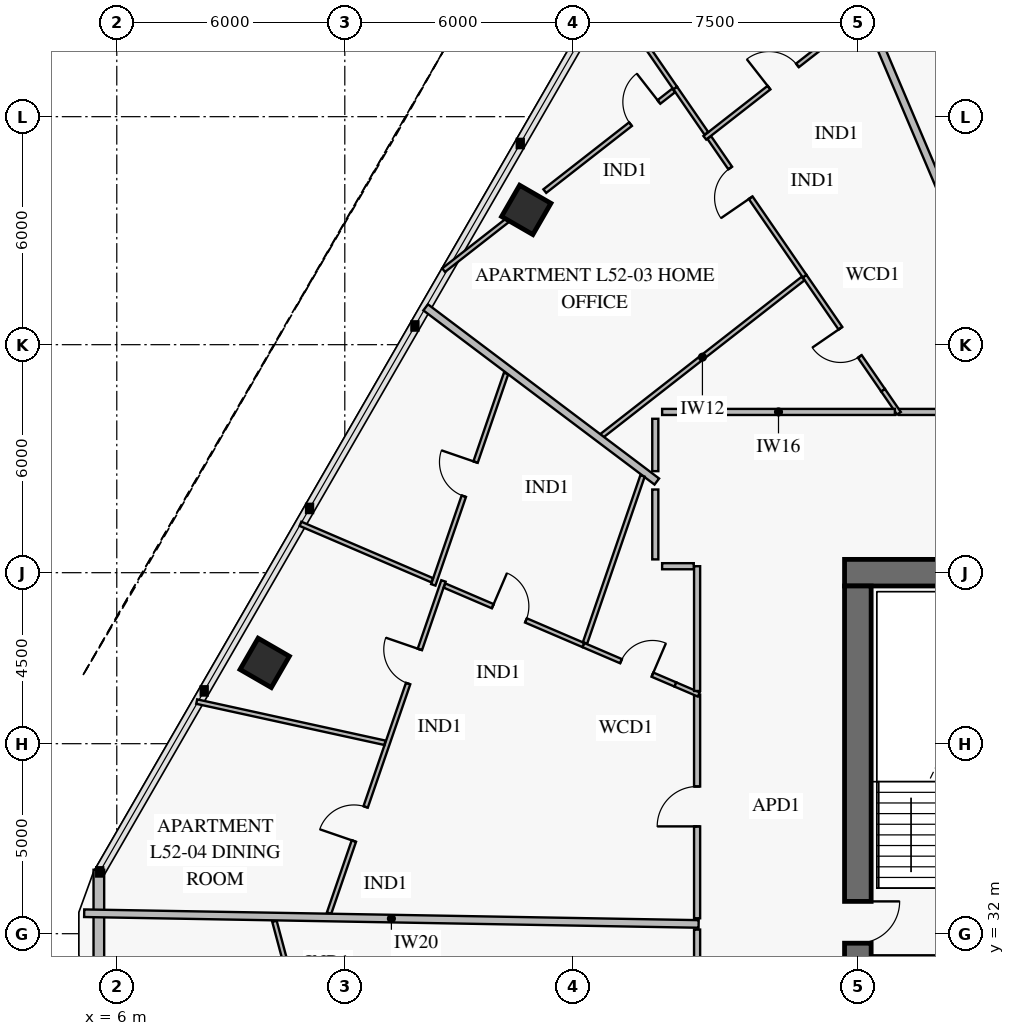
"""IFC4 building model, lengths in metres.
Left out: names, types, materials, properties, quantities, classifications, styles, units other than length and angle.
Written with IfcOpenShell. Run it as: python <this file> out.ifc"""

import sys

from ifc_helpers import new_model, si_unit, direction, frame, frame_2d, origin, origin_2d, place, context, subcontext, project, spatial, rectangle, extrude, element, fill, save


model = new_model("IFC4")
c1 = context("Model", 3, precision=1e-05, world=origin(), true_north=direction((0.0, 1.0)))
c2 = subcontext(c1, "Body", "Model", "MODEL_VIEW")
j1 = project(units=[si_unit("LENGTHUNIT", "METRE"), si_unit("PLANEANGLEUNIT", "RADIAN")], contexts=[c1])
p1 = place(None, origin())
s1 = spatial("IfcSite", under=j1, at=p1, CompositionType="ELEMENT")
p2 = place(p1, origin())
s2 = spatial("IfcBuilding", under=s1, at=p2, CompositionType="ELEMENT")
p3 = place(p2, frame((0.0, 0.0, 207.4)))
s3 = spatial("IfcBuildingStorey", under=s2, at=p3, CompositionType="ELEMENT", Elevation=207.4)
p4 = place(p3, frame((36.75, 41.5, 0.0), z_axis=(0.0, 0.0, 1.0), x_axis=(-1.0, 0.0, 0.0)))
e1 = element("IfcWall", 1, at=p4, inside=s3, PredefinedType="SHEAR", context=c2, shape_type="SweptSolid", body=[
    extrude(rectangle(XDim=11.6, YDim=0.7, at=frame_2d((5.8, 0.0))), origin(), (0.0, 0.0, 1.0), 3.8),
])
p5 = place(p4, frame((4.25, 0.0, 0.0)))
e2 = element("IfcOpeningElement", 2, at=p5, cuts=e1, PredefinedType="OPENING", context=c2, shape_type="SweptSolid", body=[
    extrude(rectangle(XDim=1.1, YDim=2.15, at=frame_2d((0.55, 1.075))), frame((0.0, 0.362, 0.0), z_axis=(0.0, -1.0, 0.0), x_axis=(1.0, 0.0, 0.0)), (0.0, 0.0, 1.0), 0.724),
])
p6 = place(p3, frame((25.5, 22.85, 0.0), z_axis=(0.0, 0.0, 1.0), x_axis=(0.0, 1.0, 0.0)))
e3 = element("IfcWall", 3, at=p6, inside=s3, PredefinedType="SHEAR", context=c2, shape_type="SweptSolid", body=[
    extrude(rectangle(XDim=18.3, YDim=0.7, at=frame_2d((9.15, 0.0))), origin(), (0.0, 0.0, 1.0), 3.8),
])
p7 = place(p6, frame((8.9, 0.0, 0.0)))
e4 = element("IfcOpeningElement", 4, at=p7, cuts=e3, PredefinedType="OPENING", context=c2, shape_type="SweptSolid", body=[
    extrude(rectangle(XDim=1.1, YDim=2.15, at=frame_2d((0.55, 1.075))), frame((0.0, 0.362, 0.0), z_axis=(0.0, -1.0, 0.0), x_axis=(1.0, 0.0, 0.0)), (0.0, 0.0, 1.0), 0.724),
])
for number, where, z_axis, x_axis in (
    (5, (16.774, 51.047, 0.0), (0.0, 0.0, 1.0), (-0.5, -0.866, 0.0)),
    (6, (9.892, 39.126, 0.0), (0.0, 0.0, 1.0), (-0.5, -0.866, 0.0)),
):
    element("IfcColumn", number, at=place(p3, frame(where, z_axis=z_axis, x_axis=x_axis)), inside=s3, PredefinedType="COLUMN", context=c2, shape_type="SweptSolid", body=[
        extrude(rectangle(XDim=0.95, YDim=0.95, at=origin_2d()), origin(), (0.0, 0.0, 1.0), 3.55),
    ])
p8 = place(p3, frame((5.528, 30.317, 0.0), z_axis=(0.0, 0.0, 1.0), x_axis=(0.0, 1.0, 0.0)))
e7 = element("IfcWall", 7, at=p8, inside=s3, PredefinedType="SOLIDWALL", context=c2, shape_type="SweptSolid", body=[
    extrude(rectangle(XDim=3.365, YDim=0.28, at=frame_2d((1.683, 0.0))), origin(), (0.0, 0.0, 1.0), 3.55),
])
p9 = place(p3, frame((25.6, 56.169, 0.0), z_axis=(0.0, 0.0, 1.0), x_axis=(-0.788007411646, -0.615665752816, 0.0)))
e8 = element("IfcWall", 8, at=p9, inside=s3, PredefinedType="PARTITIONING", context=c2, shape_type="SweptSolid", body=[
    extrude(rectangle(XDim=5.237, YDim=0.12, at=frame_2d((2.619, 0.0))), origin(), (0.0, 0.0, 1.0), 2.87),
])
p10 = place(p9, frame((2.144, 0.0, 0.0)))
e9 = element("IfcOpeningElement", 9, at=p10, cuts=e8, PredefinedType="OPENING", context=c2, shape_type="SweptSolid", body=[
    extrude(rectangle(XDim=0.95, YDim=2.1, at=frame_2d((0.475, 1.05))), frame((0.0, 0.072, 0.0), z_axis=(0.0, -1.0, 0.0), x_axis=(1.0, 0.0, 0.0)), (0.0, 0.0, 1.0), 0.144),
])
p11 = place(p3, frame((26.165, 46.3, 0.0), z_axis=(0.0, 0.0, 1.0), x_axis=(-0.566727772042, 0.823905111282, 0.0)))
e10 = element("IfcWall", 10, at=p11, inside=s3, PredefinedType="PARTITIONING", context=c2, shape_type="SweptSolid", body=[
    extrude(rectangle(XDim=3.645, YDim=0.12, at=frame_2d((1.823, 0.0))), origin(), (0.0, 0.0, 1.0), 3.55),
])
p12 = place(p11, frame((1.081, 0.0, 0.0)))
e11 = element("IfcOpeningElement", 11, at=p12, cuts=e10, PredefinedType="OPENING", context=c2, shape_type="SweptSolid", body=[
    extrude(rectangle(XDim=0.9, YDim=2.1, at=frame_2d((0.45, 1.05))), frame((0.0, 0.072, 0.0), z_axis=(0.0, -1.0, 0.0), x_axis=(1.0, 0.0, 0.0)), (0.0, 0.0, 1.0), 0.144),
])
p13 = place(p3, frame((24.099, 49.303, 0.0), z_axis=(0.0, 0.0, 1.0), x_axis=(-0.566659925213, 0.823951775991, 0.0)))
e12 = element("IfcWall", 12, at=p13, inside=s3, PredefinedType="PARTITIONING", context=c2, shape_type="SweptSolid", body=[
    extrude(rectangle(XDim=4.426, YDim=0.12, at=frame_2d((2.213, 0.0))), origin(), (0.0, 0.0, 1.0), 3.55),
])
p14 = place(p13, frame((2.504, 0.0, 0.0)))
e13 = element("IfcOpeningElement", 13, at=p14, cuts=e12, PredefinedType="OPENING", context=c2, shape_type="SweptSolid", body=[
    extrude(rectangle(XDim=0.95, YDim=2.1, at=frame_2d((0.475, 1.05))), frame((0.0, 0.072, 0.0), z_axis=(0.0, -1.0, 0.0), x_axis=(1.0, 0.0, 0.0)), (0.0, 0.0, 1.0), 0.144),
])
p15 = place(p3, frame((21.513, 53.062, 0.0), z_axis=(0.0, 0.0, 1.0), x_axis=(-0.566722311628, 0.823908867232, 0.0)))
e14 = element("IfcWall", 14, at=p15, inside=s3, PredefinedType="PARTITIONING", context=c2, shape_type="SweptSolid", body=[
    extrude(rectangle(XDim=1.446, YDim=0.12, at=frame_2d((0.723, 0.0))), origin(), (0.0, 0.0, 1.0), 2.87),
])
p16 = place(p3, frame((20.655, 54.191, 0.0), z_axis=(0.0, 0.0, 1.0), x_axis=(-0.788021793937, -0.615647344086, 0.0)))
e15 = element("IfcWall", 15, at=p16, inside=s3, PredefinedType="PARTITIONING", context=c2, shape_type="SweptSolid", body=[
    extrude(rectangle(XDim=4.304, YDim=0.12, at=frame_2d((2.152, 0.0))), origin(), (0.0, 0.0, 1.0), 2.87),
])
p17 = place(p16, frame((0.493, 0.0, 0.0)))
e16 = element("IfcOpeningElement", 16, at=p17, cuts=e15, PredefinedType="OPENING", context=c2, shape_type="SweptSolid", body=[
    extrude(rectangle(XDim=0.95, YDim=2.1, at=frame_2d((0.475, 1.05))), frame((0.0, 0.072, 0.0), z_axis=(0.0, -1.0, 0.0), x_axis=(1.0, 0.0, 0.0)), (0.0, 0.0, 1.0), 0.144),
])
p18 = place(p3, frame((30.008, 45.73, 0.0), z_axis=(0.0, 0.0, 1.0), x_axis=(-1.0, 0.0, 0.0)))
e17 = element("IfcWall", 17, at=p18, inside=s3, PredefinedType="PARTITIONING", context=c2, shape_type="SweptSolid", body=[
    extrude(rectangle(XDim=3.427, YDim=0.16, at=frame_2d((1.714, 0.0))), origin(), (0.0, 0.0, 1.0), 3.55),
])
p19 = place(p18, frame((1.189, 0.0, 0.0)))
e18 = element("IfcOpeningElement", 18, at=p19, cuts=e17, PredefinedType="OPENING", context=c2, shape_type="SweptSolid", body=[
    extrude(rectangle(XDim=1.05, YDim=2.15, at=frame_2d((0.525, 1.075))), frame((0.0, 0.092, 0.0), z_axis=(0.0, -1.0, 0.0), x_axis=(1.0, 0.0, 0.0)), (0.0, 0.0, 1.0), 0.184),
])
p20 = place(p3, frame((14.596, 41.283, 0.0), z_axis=(0.0, 0.0, 1.0), x_axis=(-0.325558599515, -0.945521865576, 0.0)))
e19 = element("IfcWall", 19, at=p20, inside=s3, PredefinedType="PARTITIONING", context=c2, shape_type="SweptSolid", body=[
    extrude(rectangle(XDim=9.247, YDim=0.12, at=frame_2d((4.624, 0.0))), origin(), (0.0, 0.0, 1.0), 2.9),
])
p21 = place(p20, frame((1.906, 0.0, 0.0)))
e20 = element("IfcOpeningElement", 20, at=p21, cuts=e19, PredefinedType="OPENING", context=c2, shape_type="SweptSolid", body=[
    extrude(rectangle(XDim=0.95, YDim=2.1, at=frame_2d((0.475, 1.05))), frame((0.0, 0.072, 0.0), z_axis=(0.0, -1.0, 0.0), x_axis=(1.0, 0.0, 0.0)), (0.0, 0.0, 1.0), 0.144),
])
p22 = place(p20, frame((6.289, 0.0, 0.0)))
e21 = element("IfcOpeningElement", 21, at=p22, cuts=e19, PredefinedType="OPENING", context=c2, shape_type="SweptSolid", body=[
    extrude(rectangle(XDim=0.95, YDim=2.1, at=frame_2d((0.475, 1.05))), frame((0.0, 0.072, 0.0), z_axis=(0.0, -1.0, 0.0), x_axis=(1.0, 0.0, 0.0)), (0.0, 0.0, 1.0), 0.144),
])
p23 = place(p3, frame((20.7, 38.558, 0.0), z_axis=(0.0, 0.0, 1.0), x_axis=(-0.919154606235, 0.393896953322, 0.0)))
e22 = element("IfcWall", 22, at=p23, inside=s3, PredefinedType="PARTITIONING", context=c2, shape_type="SweptSolid", body=[
    extrude(rectangle(XDim=2.637, YDim=0.12, at=frame_2d((1.319, 0.0))), origin(), (0.0, 0.0, 1.0), 3.55),
])
p24 = place(p23, frame((0.658, 0.0, 0.0)))
e23 = element("IfcOpeningElement", 23, at=p24, cuts=e22, PredefinedType="OPENING", context=c2, shape_type="SweptSolid", body=[
    extrude(rectangle(XDim=0.9, YDim=2.1, at=frame_2d((0.45, 1.05))), frame((0.0, 0.072, 0.0), z_axis=(0.0, -1.0, 0.0), x_axis=(1.0, 0.0, 0.0)), (0.0, 0.0, 1.0), 0.144),
])
p25 = place(p3, frame((18.276, 39.596, 0.0), z_axis=(0.0, 0.0, 1.0), x_axis=(-0.919125948941, 0.393963818115, 0.0)))
e24 = element("IfcWall", 24, at=p25, inside=s3, PredefinedType="PARTITIONING", context=c2, shape_type="SweptSolid", body=[
    extrude(rectangle(XDim=3.971, YDim=0.12, at=frame_2d((1.985, 0.0))), origin(), (0.0, 0.0, 1.0), 3.15),
])
p26 = place(p25, frame((1.642, 0.0, 0.0)))
e25 = element("IfcOpeningElement", 25, at=p26, cuts=e24, PredefinedType="OPENING", context=c2, shape_type="SweptSolid", body=[
    extrude(rectangle(XDim=0.95, YDim=2.1, at=frame_2d((0.475, 1.05))), frame((0.0, 0.072, 0.0), z_axis=(0.0, -1.0, 0.0), x_axis=(1.0, 0.0, 0.0)), (0.0, 0.0, 1.0), 0.144),
])
p27 = place(p3, frame((16.244, 46.743, 0.0), z_axis=(0.0, 0.0, 1.0), x_axis=(-0.325548210575, -0.945525442593, 0.0)))
e26 = element("IfcWall", 26, at=p27, inside=s3, PredefinedType="PARTITIONING", context=c2, shape_type="SweptSolid", body=[
    extrude(rectangle(XDim=5.884, YDim=0.12, at=frame_2d((2.942, 0.0))), origin(), (0.0, 0.0, 1.0), 3.55),
])
p28 = place(p27, frame((2.467, 0.0, 0.0)))
e27 = element("IfcOpeningElement", 27, at=p28, cuts=e26, PredefinedType="OPENING", context=c2, shape_type="SweptSolid", body=[
    extrude(rectangle(XDim=0.95, YDim=2.1, at=frame_2d((0.475, 1.05))), frame((0.0, 0.072, 0.0), z_axis=(0.0, -1.0, 0.0), x_axis=(1.0, 0.0, 0.0)), (0.0, 0.0, 1.0), 0.144),
])
p29 = place(p3, frame((21.27, 38.292, 0.0), z_axis=(0.0, 0.0, 1.0), x_axis=(0.0, -1.0, 0.0)))
e28 = element("IfcWall", 28, at=p29, inside=s3, PredefinedType="PARTITIONING", context=c2, shape_type="SweptSolid", body=[
    extrude(rectangle(XDim=5.886, YDim=0.16, at=frame_2d((2.943, 0.0))), origin(), (0.0, 0.0, 1.0), 2.9),
])
p30 = place(p29, frame((2.418, 0.0, 0.0)))
e29 = element("IfcOpeningElement", 29, at=p30, cuts=e28, PredefinedType="OPENING", context=c2, shape_type="SweptSolid", body=[
    extrude(rectangle(XDim=1.05, YDim=2.15, at=frame_2d((0.525, 1.075))), frame((0.0, 0.092, 0.0), z_axis=(0.0, -1.0, 0.0), x_axis=(1.0, 0.0, 0.0)), (0.0, 0.0, 1.0), 0.184),
])
p31 = place(p3, frame((10.149, 32.326, 0.0), z_axis=(0.0, 0.0, 1.0), x_axis=(0.258800576513, -0.965930774743, 0.0)))
e30 = element("IfcWall", 30, at=p31, inside=s3, PredefinedType="PARTITIONING", context=c2, shape_type="SweptSolid", body=[
    extrude(rectangle(XDim=5.488, YDim=0.12, at=frame_2d((2.744, 0.0))), origin(), (0.0, 0.0, 1.0), 3.55),
])
p32 = place(p31, frame((2.269, 0.0, 0.0)))
e31 = element("IfcOpeningElement", 31, at=p32, cuts=e30, PredefinedType="OPENING", context=c2, shape_type="SweptSolid", body=[
    extrude(rectangle(XDim=0.95, YDim=2.1, at=frame_2d((0.475, 1.05))), frame((0.0, 0.072, 0.0), z_axis=(0.0, -1.0, 0.0), x_axis=(1.0, 0.0, 0.0)), (0.0, 0.0, 1.0), 0.144),
])
p33 = place(p3, frame((21.27, 32.108, 0.0), z_axis=(0.0, 0.0, 1.0), x_axis=(0.0, -1.0, 0.0)))
e32 = element("IfcWall", 32, at=p33, inside=s3, PredefinedType="PARTITIONING", context=c2, shape_type="SweptSolid", body=[
    extrude(rectangle(XDim=3.026, YDim=0.16, at=frame_2d((1.513, 0.0))), origin(), (0.0, 0.0, 1.0), 3.55),
])
p34 = place(p33, frame((0.988, 0.0, 0.0)))
e33 = element("IfcOpeningElement", 33, at=p34, cuts=e32, PredefinedType="OPENING", context=c2, shape_type="SweptSolid", body=[
    extrude(rectangle(XDim=1.05, YDim=2.15, at=frame_2d((0.525, 1.075))), frame((0.0, 0.092, 0.0), z_axis=(0.0, -1.0, 0.0), x_axis=(1.0, 0.0, 0.0)), (0.0, 0.0, 1.0), 0.184),
])
p35 = place(p3, frame((30.189, 45.69, 0.0), z_axis=(0.0, 0.0, 1.0), x_axis=(-0.390732904656, 0.920504099512, 0.0)))
e34 = element("IfcWall", 34, at=p35, inside=s3, PredefinedType="PARTITIONING", context=c2, shape_type="SweptSolid", body=[
    extrude(rectangle(XDim=14.658, YDim=0.2, at=frame_2d((7.329, 0.0))), origin(), (0.0, 0.0, 1.0), 2.87),
])
p36 = place(p3, frame((26.581, 45.695, 0.0), z_axis=(0.0, 0.0, 1.0), x_axis=(-0.566683975736, 0.823935235103, 0.0)))
e35 = element("IfcWall", 35, at=p36, inside=s3, PredefinedType="PARTITIONING", context=c2, shape_type="SweptSolid", body=[
    extrude(rectangle(XDim=0.735, YDim=0.12, at=frame_2d((0.367, 0.0))), origin(), (0.0, 0.0, 1.0), 3.55),
])
p37 = place(p3, frame((20.694, 54.253, 0.0), z_axis=(0.0, 0.0, 1.0), x_axis=(-0.566668928945, 0.823945583742, 0.0)))
e36 = element("IfcWall", 36, at=p37, inside=s3, PredefinedType="PARTITIONING", context=c2, shape_type="SweptSolid", body=[
    extrude(rectangle(XDim=3.106, YDim=0.12, at=frame_2d((1.553, 0.0))), origin(), (0.0, 0.0, 1.0), 3.55),
])
p38 = place(p3, frame((24.059, 49.241, 0.0), z_axis=(0.0, 0.0, 1.0), x_axis=(-0.78800895829, -0.615663773219, 0.0)))
e37 = element("IfcWall", 37, at=p38, inside=s3, PredefinedType="PARTITIONING", context=c2, shape_type="SweptSolid", body=[
    extrude(rectangle(XDim=6.723, YDim=0.12, at=frame_2d((3.362, 0.0))), origin(), (0.0, 0.0, 1.0), 2.9),
])
p39 = place(p3, frame((16.28, 50.773, 0.0), z_axis=(0.0, 0.0, 1.0), x_axis=(-0.787993108164, -0.615684059795, 0.0)))
e38 = element("IfcWall", 38, at=p39, inside=s3, PredefinedType="PARTITIONING", context=c2, shape_type="SweptSolid", body=[
    extrude(rectangle(XDim=2.131, YDim=0.12, at=frame_2d((1.065, 0.0))), origin(), (0.0, 0.0, 1.0), 3.55),
])
p40 = place(p3, frame((20.21, 43.899, 0.0), z_axis=(0.0, 0.0, 1.0), x_axis=(-0.798624602277, 0.601829497979, 0.0)))
e39 = element("IfcWall", 39, at=p40, inside=s3, PredefinedType="PARTITIONING", context=c2, shape_type="SweptSolid", body=[
    extrude(rectangle(XDim=7.616, YDim=0.2, at=frame_2d((3.808, 0.0))), origin(), (0.0, 0.0, 1.0), 2.87),
])
p41 = place(p3, frame((13.057, 37.023, 0.0), z_axis=(0.0, 0.0, 1.0), x_axis=(-0.976856341371, 0.21389644299, 0.0)))
e40 = element("IfcWall", 40, at=p41, inside=s3, PredefinedType="PARTITIONING", context=c2, shape_type="SweptSolid", body=[
    extrude(rectangle(XDim=5.071, YDim=0.12, at=frame_2d((2.536, 0.0))), origin(), (0.0, 0.0, 1.0), 2.87),
])
p42 = place(p3, frame((21.313, 38.295, 0.0), z_axis=(0.0, 0.0, 1.0), x_axis=(-0.919163962833, 0.393875119079, 0.0)))
e41 = element("IfcWall", 41, at=p42, inside=s3, PredefinedType="PARTITIONING", context=c2, shape_type="SweptSolid", body=[
    extrude(rectangle(XDim=0.667, YDim=0.12, at=frame_2d((0.333, 0.0))), origin(), (0.0, 0.0, 1.0), 3.55),
])
p43 = place(p3, frame((14.298, 41.301, 0.0), z_axis=(0.0, 0.0, 1.0), x_axis=(-0.919128279921, 0.393958379845, 0.0)))
e42 = element("IfcWall", 42, at=p43, inside=s3, PredefinedType="PARTITIONING", context=c2, shape_type="SweptSolid", body=[
    extrude(rectangle(XDim=3.77, YDim=0.12, at=frame_2d((1.885, 0.0))), origin(), (0.0, 0.0, 1.0), 2.87),
])
p44 = place(p3, frame((19.834, 44.046, 0.0), z_axis=(0.0, 0.0, 1.0), x_axis=(-0.325524485892, -0.945533610764, 0.0)))
e43 = element("IfcWall", 43, at=p44, inside=s3, PredefinedType="PARTITIONING", context=c2, shape_type="SweptSolid", body=[
    extrude(rectangle(XDim=4.648, YDim=0.12, at=frame_2d((2.324, 0.0))), origin(), (0.0, 0.0, 1.0), 3.15),
])
p45 = place(p3, frame((21.31, 32.256, 0.0), z_axis=(0.0, 0.0, 1.0), x_axis=(-0.999847675861, 0.017453511821, 0.0)))
e44 = element("IfcWall", 44, at=p45, inside=s3, PredefinedType="PARTITIONING", context=c2, shape_type="SweptSolid", body=[
    extrude(rectangle(XDim=16.17, YDim=0.2, at=frame_2d((8.085, 0.0))), origin(), (0.0, 0.0, 1.0), 2.87),
])
p46 = place(p3, frame((26.474, 45.73, 0.0), z_axis=(0.0, 0.0, 1.0), x_axis=(-1.0, 0.0, 0.0)))
e45 = element("IfcWall", 45, at=p46, inside=s3, PredefinedType="PARTITIONING", context=c2, shape_type="SweptSolid", body=[
    extrude(rectangle(XDim=6.124, YDim=0.16, at=frame_2d((3.062, 0.0))), origin(), (0.0, 0.0, 1.0), 2.9),
])
p47 = place(p3, frame((20.17, 45.55, 0.0), z_axis=(0.0, 0.0, 1.0), x_axis=(0.0, -1.0, 0.0)))
e46 = element("IfcWall", 46, at=p47, inside=s3, PredefinedType="PARTITIONING", context=c2, shape_type="SweptSolid", body=[
    extrude(rectangle(XDim=1.378, YDim=0.16, at=frame_2d((0.689, 0.0))), origin(), (0.0, 0.0, 1.0), 3.15),
])
p48 = place(p3, frame((21.27, 41.67, 0.0), z_axis=(0.0, 0.0, 1.0), x_axis=(0.0, -1.0, 0.0)))
e47 = element("IfcWall", 47, at=p48, inside=s3, PredefinedType="PARTITIONING", context=c2, shape_type="SweptSolid", body=[
    extrude(rectangle(XDim=3.283, YDim=0.16, at=frame_2d((1.641, 0.0))), origin(), (0.0, 0.0, 1.0), 3.55),
])
p49 = place(p3, frame((20.17, 43.689, 0.0), z_axis=(0.0, 0.0, 1.0), x_axis=(0.0, -1.0, 0.0)))
e48 = element("IfcWall", 48, at=p49, inside=s3, PredefinedType="PARTITIONING", context=c2, shape_type="SweptSolid", body=[
    extrude(rectangle(XDim=1.839, YDim=0.16, at=frame_2d((0.919, 0.0))), origin(), (0.0, 0.0, 1.0), 3.55),
])
p50 = place(p3, frame((20.35, 41.67, 0.0), z_axis=(0.0, 0.0, 1.0), x_axis=(1.0, 0.0, 0.0)))
e49 = element("IfcWall", 49, at=p50, inside=s3, PredefinedType="PARTITIONING", context=c2, shape_type="SweptSolid", body=[
    extrude(rectangle(XDim=0.832, YDim=0.16, at=frame_2d((0.416, 0.0))), origin(), (0.0, 0.0, 1.0), 3.55),
])
p51 = place(p7, frame((1.1, 0.0, 0.0), z_axis=(0.0, 0.0, 1.0), x_axis=(-1.0, 0.0, 0.0)))
e50 = element("IfcDoor", 50, at=p51, inside=s3, OperationType="SINGLE_SWING_LEFT", PredefinedType="USERDEFINED", context=c2, shape_type="SweptSolid", body=[
    extrude(rectangle(XDim=1.1, YDim=2.15, at=frame_2d((0.55, 1.075))), frame((0.0, 0.025, 0.0), z_axis=(0.0, -1.0, 0.0), x_axis=(1.0, 0.0, 0.0)), (0.0, 0.0, 1.0), 0.05),
])
fill(e4, e50)
p52 = place(p10, frame((0.95, 0.0, 0.0), z_axis=(0.0, 0.0, 1.0), x_axis=(-1.0, 0.0, 0.0)))
e51 = element("IfcDoor", 51, at=p52, inside=s3, OperationType="SINGLE_SWING_LEFT", PredefinedType="DOOR", context=c2, shape_type="SweptSolid", body=[
    extrude(rectangle(XDim=0.95, YDim=2.1, at=frame_2d((0.475, 1.05))), frame((0.0, 0.025, 0.0), z_axis=(0.0, -1.0, 0.0), x_axis=(1.0, 0.0, 0.0)), (0.0, 0.0, 1.0), 0.05),
])
fill(e9, e51)
p53 = place(p12, origin())
e52 = element("IfcDoor", 52, at=p53, inside=s3, OperationType="SINGLE_SWING_RIGHT", PredefinedType="DOOR", context=c2, shape_type="SweptSolid", body=[
    extrude(rectangle(XDim=0.9, YDim=2.1, at=frame_2d((0.45, 1.05))), frame((0.0, 0.025, 0.0), z_axis=(0.0, -1.0, 0.0), x_axis=(1.0, 0.0, 0.0)), (0.0, 0.0, 1.0), 0.05),
])
fill(e11, e52)
p54 = place(p14, origin())
e53 = element("IfcDoor", 53, at=p54, inside=s3, OperationType="SINGLE_SWING_LEFT", PredefinedType="DOOR", context=c2, shape_type="SweptSolid", body=[
    extrude(rectangle(XDim=0.95, YDim=2.1, at=frame_2d((0.475, 1.05))), frame((0.0, 0.025, 0.0), z_axis=(0.0, -1.0, 0.0), x_axis=(1.0, 0.0, 0.0)), (0.0, 0.0, 1.0), 0.05),
])
fill(e13, e53)
p55 = place(p17, frame((0.95, 0.0, 0.0), z_axis=(0.0, 0.0, 1.0), x_axis=(-1.0, 0.0, 0.0)))
e54 = element("IfcDoor", 54, at=p55, inside=s3, OperationType="SINGLE_SWING_RIGHT", PredefinedType="DOOR", context=c2, shape_type="SweptSolid", body=[
    extrude(rectangle(XDim=0.95, YDim=2.1, at=frame_2d((0.475, 1.05))), frame((0.0, 0.025, 0.0), z_axis=(0.0, -1.0, 0.0), x_axis=(1.0, 0.0, 0.0)), (0.0, 0.0, 1.0), 0.05),
])
fill(e16, e54)
p56 = place(p21, frame((0.95, 0.0, 0.0), z_axis=(0.0, 0.0, 1.0), x_axis=(-1.0, 0.0, 0.0)))
e55 = element("IfcDoor", 55, at=p56, inside=s3, OperationType="SINGLE_SWING_RIGHT", PredefinedType="DOOR", context=c2, shape_type="SweptSolid", body=[
    extrude(rectangle(XDim=0.95, YDim=2.1, at=frame_2d((0.475, 1.05))), frame((0.0, 0.025, 0.0), z_axis=(0.0, -1.0, 0.0), x_axis=(1.0, 0.0, 0.0)), (0.0, 0.0, 1.0), 0.05),
])
fill(e20, e55)
p57 = place(p22, frame((0.95, 0.0, 0.0), z_axis=(0.0, 0.0, 1.0), x_axis=(-1.0, 0.0, 0.0)))
e56 = element("IfcDoor", 56, at=p57, inside=s3, OperationType="SINGLE_SWING_LEFT", PredefinedType="DOOR", context=c2, shape_type="SweptSolid", body=[
    extrude(rectangle(XDim=0.95, YDim=2.1, at=frame_2d((0.475, 1.05))), frame((0.0, 0.025, 0.0), z_axis=(0.0, -1.0, 0.0), x_axis=(1.0, 0.0, 0.0)), (0.0, 0.0, 1.0), 0.05),
])
fill(e21, e56)
p58 = place(p24, frame((0.9, 0.0, 0.0), z_axis=(0.0, 0.0, 1.0), x_axis=(-1.0, 0.0, 0.0)))
e57 = element("IfcDoor", 57, at=p58, inside=s3, OperationType="SINGLE_SWING_RIGHT", PredefinedType="DOOR", context=c2, shape_type="SweptSolid", body=[
    extrude(rectangle(XDim=0.9, YDim=2.1, at=frame_2d((0.45, 1.05))), frame((0.0, 0.025, 0.0), z_axis=(0.0, -1.0, 0.0), x_axis=(1.0, 0.0, 0.0)), (0.0, 0.0, 1.0), 0.05),
])
fill(e23, e57)
p59 = place(p26, frame((0.95, 0.0, 0.0), z_axis=(0.0, 0.0, 1.0), x_axis=(-1.0, 0.0, 0.0)))
e58 = element("IfcDoor", 58, at=p59, inside=s3, OperationType="SINGLE_SWING_LEFT", PredefinedType="DOOR", context=c2, shape_type="SweptSolid", body=[
    extrude(rectangle(XDim=0.95, YDim=2.1, at=frame_2d((0.475, 1.05))), frame((0.0, 0.025, 0.0), z_axis=(0.0, -1.0, 0.0), x_axis=(1.0, 0.0, 0.0)), (0.0, 0.0, 1.0), 0.05),
])
fill(e25, e58)
p60 = place(p28, frame((0.95, 0.0, 0.0), z_axis=(0.0, 0.0, 1.0), x_axis=(-1.0, 0.0, 0.0)))
e59 = element("IfcDoor", 59, at=p60, inside=s3, OperationType="SINGLE_SWING_RIGHT", PredefinedType="DOOR", context=c2, shape_type="SweptSolid", body=[
    extrude(rectangle(XDim=0.95, YDim=2.1, at=frame_2d((0.475, 1.05))), frame((0.0, 0.025, 0.0), z_axis=(0.0, -1.0, 0.0), x_axis=(1.0, 0.0, 0.0)), (0.0, 0.0, 1.0), 0.05),
])
fill(e27, e59)
p61 = place(p30, frame((1.05, 0.0, 0.0), z_axis=(0.0, 0.0, 1.0), x_axis=(-1.0, 0.0, 0.0)))
e60 = element("IfcDoor", 60, at=p61, inside=s3, OperationType="SINGLE_SWING_LEFT", PredefinedType="DOOR", context=c2, shape_type="SweptSolid", body=[
    extrude(rectangle(XDim=1.05, YDim=2.15, at=frame_2d((0.525, 1.075))), frame((0.0, 0.025, 0.0), z_axis=(0.0, -1.0, 0.0), x_axis=(1.0, 0.0, 0.0)), (0.0, 0.0, 1.0), 0.05),
])
fill(e29, e60)
save(model, sys.argv[1])
